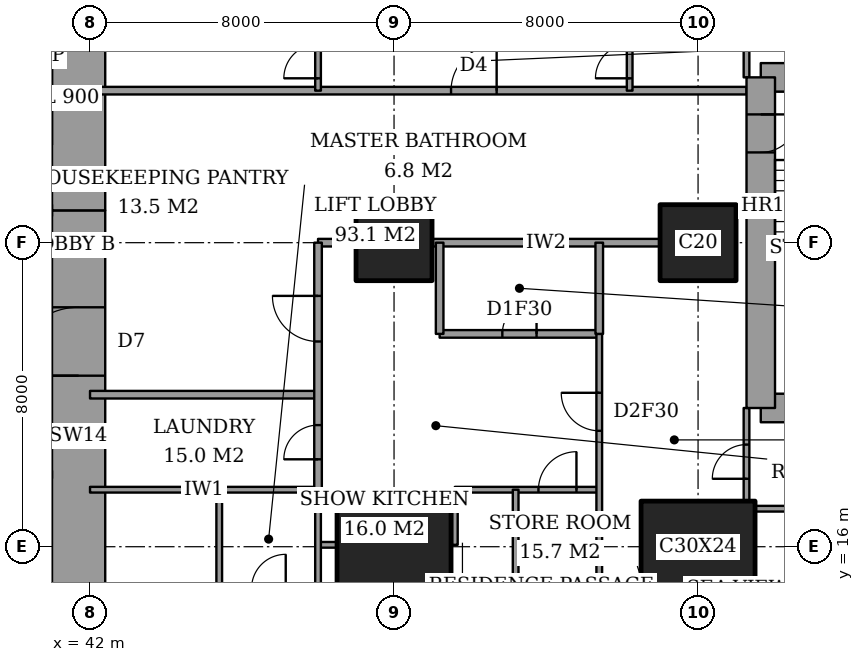
"""IFC4 building model, lengths in metres.
Left out: names, types, materials, properties, quantities, classifications, styles, units other than length and angle.
Written with IfcOpenShell. Run it as: python <this file> out.ifc"""

import sys

from ifc_helpers import new_model, si_unit, direction, frame, frame_2d, origin, origin_2d, place, context, subcontext, project, spatial, rectangle, extrude, element, fill, save


model = new_model("IFC4")
c1 = context("Model", 3, precision=1e-05, world=origin(), true_north=direction((0.0, 1.0)))
c2 = subcontext(c1, "Body", "Model", "MODEL_VIEW")
j1 = project(units=[si_unit("LENGTHUNIT", "METRE"), si_unit("PLANEANGLEUNIT", "RADIAN")], contexts=[c1])
p1 = place(None, origin())
s1 = spatial("IfcSite", under=j1, at=p1, CompositionType="ELEMENT")
p2 = place(p1, origin())
s2 = spatial("IfcBuilding", under=s1, at=p2, CompositionType="ELEMENT")
p3 = place(p2, frame((0.0, 0.0, 128.6)))
s3 = spatial("IfcBuildingStorey", under=s2, at=p3, CompositionType="ELEMENT", Elevation=128.6)
p4 = place(p3, frame((50.0, 16.0, 0.0), z_axis=(0.0, 0.0, 1.0), x_axis=(1.0, 0.0, 0.0)))
e1 = element("IfcColumn", 1, at=p4, inside=s3, PredefinedType="COLUMN", context=c2, shape_type="SweptSolid", body=[
    extrude(rectangle(XDim=3.0, YDim=2.4, at=origin_2d()), origin(), (0.0, 0.0, 1.0), 3.6),
])
p5 = place(p3, frame((50.0, 24.0, 0.0), z_axis=(0.0, 0.0, 1.0), x_axis=(1.0, 0.0, 0.0)))
e2 = element("IfcColumn", 2, at=p5, inside=s3, PredefinedType="COLUMN", context=c2, shape_type="SweptSolid", body=[
    extrude(rectangle(XDim=2.0, YDim=2.0, at=origin_2d()), origin(), (0.0, 0.0, 1.0), 3.6),
])
p6 = place(p3, frame((58.0, 16.0, 0.0), z_axis=(0.0, 0.0, 1.0), x_axis=(1.0, 0.0, 0.0)))
e3 = element("IfcColumn", 3, at=p6, inside=s3, PredefinedType="COLUMN", context=c2, shape_type="SweptSolid", body=[
    extrude(rectangle(XDim=3.0, YDim=2.4, at=origin_2d()), origin(), (0.0, 0.0, 1.0), 3.6),
])
p7 = place(p3, frame((58.0, 24.0, 0.0), z_axis=(0.0, 0.0, 1.0), x_axis=(1.0, 0.0, 0.0)))
e4 = element("IfcColumn", 4, at=p7, inside=s3, PredefinedType="COLUMN", context=c2, shape_type="SweptSolid", body=[
    extrude(rectangle(XDim=2.0, YDim=2.0, at=origin_2d()), origin(), (0.0, 0.0, 1.0), 3.6),
])
p8 = place(p3, frame((41.7, 13.0, 0.0), z_axis=(0.0, 0.0, 1.0), x_axis=(0.0, 1.0, 0.0)))
e5 = element("IfcWall", 5, at=p8, inside=s3, PredefinedType="SHEAR", context=c2, shape_type="SweptSolid", body=[
    extrude(rectangle(XDim=11.85, YDim=1.4, at=frame_2d((5.925, 0.0))), origin(), (0.0, 0.0, 1.0), 3.6),
])
p9 = place(p8, frame((7.5, 0.0, 0.0)))
e6 = element("IfcOpeningElement", 6, at=p9, cuts=e5, PredefinedType="OPENING", context=c2, shape_type="SweptSolid", body=[
    extrude(rectangle(XDim=1.8, YDim=2.4, at=frame_2d((0.9, 1.2))), frame((0.0, 0.71, 0.0), z_axis=(0.0, -1.0, 0.0), x_axis=(1.0, 0.0, 0.0)), (0.0, 0.0, 1.0), 1.42),
])
p10 = place(p3, frame((41.7, 24.85, 0.0), z_axis=(0.0, 0.0, 1.0), x_axis=(0.0, 1.0, 0.0)))
e7 = element("IfcWall", 7, at=p10, inside=s3, PredefinedType="SHEAR", context=c2, shape_type="SweptSolid", body=[
    extrude(rectangle(XDim=10.15, YDim=1.4, at=frame_2d((5.075, 0.0))), origin(), (0.0, 0.0, 1.0), 3.6),
])
for number, where, z_axis, x_axis in (
    (8, (59.65, 19.65, 0.0), (0.0, 0.0, 1.0), (1.0, 0.0, 0.0)),
    (9, (64.1, 28.35, 0.0), (0.0, 0.0, 1.0), (-1.0, 0.0, 0.0)),
):
    element("IfcWall", number, at=place(p3, frame(where, z_axis=z_axis, x_axis=x_axis)), inside=s3, PredefinedType="SHEAR", context=c2, shape_type="SweptSolid", body=[
        extrude(rectangle(XDim=4.45, YDim=0.75, at=frame_2d((2.225, 0.0))), origin(), (0.0, 0.0, 1.0), 3.6),
    ])
p11 = place(p3, frame((59.65, 28.35, 0.0), z_axis=(0.0, 0.0, 1.0), x_axis=(0.0, -1.0, 0.0)))
e10 = element("IfcWall", 10, at=p11, inside=s3, PredefinedType="SHEAR", context=c2, shape_type="SweptSolid", body=[
    extrude(rectangle(XDim=8.7, YDim=0.75, at=frame_2d((4.35, 0.0))), origin(), (0.0, 0.0, 1.0), 3.6),
])
p12 = place(p11, frame((0.975, 0.0, 0.0)))
e11 = element("IfcOpeningElement", 11, at=p12, cuts=e10, PredefinedType="OPENING", context=c2, shape_type="SweptSolid", body=[
    extrude(rectangle(XDim=1.0, YDim=2.1, at=frame_2d((0.5, 1.05))), frame((0.0, 0.385, 0.0), z_axis=(0.0, -1.0, 0.0), x_axis=(1.0, 0.0, 0.0)), (0.0, 0.0, 1.0), 0.77),
])
p13 = place(p3, frame((55.4, 15.0, 0.0), z_axis=(0.0, 0.0, 1.0), x_axis=(1.0, 0.0, 0.0)))
e12 = element("IfcWall", 12, at=p13, inside=s3, PredefinedType="PARTITIONING", context=c2, shape_type="SweptSolid", body=[
    extrude(rectangle(XDim=1.1, YDim=0.15, at=frame_2d((0.55, 0.0))), origin(), (0.0, 0.0, 1.0), 3.35),
])
p14 = place(p3, frame((48.0, 16.05, 0.0), z_axis=(0.0, 0.0, 1.0), x_axis=(1.0, 0.0, 0.0)))
e13 = element("IfcWall", 13, at=p14, inside=s3, PredefinedType="PARTITIONING", context=c2, shape_type="SweptSolid", body=[
    extrude(rectangle(XDim=0.5, YDim=0.15, at=frame_2d((0.25, 0.0))), origin(), (0.0, 0.0, 1.0), 3.35),
])
p15 = place(p3, frame((59.5, 17.0, 0.0), z_axis=(0.0, 0.0, 1.0), x_axis=(1.0, 0.0, 0.0)))
e14 = element("IfcWall", 14, at=p15, inside=s3, PredefinedType="PARTITIONING", context=c2, shape_type="SweptSolid", body=[
    extrude(rectangle(XDim=5.15, YDim=0.15, at=frame_2d((2.575, 0.0))), origin(), (0.0, 0.0, 1.0), 3.35),
])
p16 = place(p3, frame((42.0, 17.5, 0.0), z_axis=(0.0, 0.0, 1.0), x_axis=(1.0, 0.0, 0.0)))
e15 = element("IfcWall", 15, at=p16, inside=s3, PredefinedType="PARTITIONING", context=c2, shape_type="SweptSolid", body=[
    extrude(rectangle(XDim=6.0, YDim=0.15, at=frame_2d((3.0, 0.0))), origin(), (0.0, 0.0, 1.0), 3.35),
])
p17 = place(p3, frame((51.6, 17.5, 0.0), z_axis=(0.0, 0.0, 1.0), x_axis=(1.0, 0.0, 0.0)))
e16 = element("IfcWall", 16, at=p17, inside=s3, PredefinedType="PARTITIONING", context=c2, shape_type="SweptSolid", body=[
    extrude(rectangle(XDim=3.8, YDim=0.15, at=frame_2d((1.9, 0.0))), origin(), (0.0, 0.0, 1.0), 3.35),
])
p18 = place(p17, frame((2.2, 0.0, 0.0)))
e17 = element("IfcOpeningElement", 17, at=p18, cuts=e16, PredefinedType="OPENING", context=c2, shape_type="SweptSolid", body=[
    extrude(rectangle(XDim=1.0, YDim=2.1, at=frame_2d((0.5, 1.05))), frame((0.0, 0.085, 0.0), z_axis=(0.0, -1.0, 0.0), x_axis=(1.0, 0.0, 0.0)), (0.0, 0.0, 1.0), 0.17),
])
p19 = place(p3, frame((42.0, 20.0, 0.0), z_axis=(0.0, 0.0, 1.0), x_axis=(1.0, 0.0, 0.0)))
e18 = element("IfcWall", 18, at=p19, inside=s3, PredefinedType="PARTITIONING", context=c2, shape_type="SweptSolid", body=[
    extrude(rectangle(XDim=6.0, YDim=0.2, at=frame_2d((3.0, 0.0))), origin(), (0.0, 0.0, 1.0), 3.35),
])
p20 = place(p3, frame((51.2, 21.6, 0.0), z_axis=(0.0, 0.0, 1.0), x_axis=(1.0, 0.0, 0.0)))
e19 = element("IfcWall", 19, at=p20, inside=s3, PredefinedType="PARTITIONING", context=c2, shape_type="SweptSolid", body=[
    extrude(rectangle(XDim=4.2, YDim=0.2, at=frame_2d((2.1, 0.0))), origin(), (0.0, 0.0, 1.0), 3.35),
])
p21 = place(p20, frame((1.65, 0.0, 0.0)))
e20 = element("IfcOpeningElement", 20, at=p21, cuts=e19, PredefinedType="OPENING", context=c2, shape_type="SweptSolid", body=[
    extrude(rectangle(XDim=0.9, YDim=2.1, at=frame_2d((0.45, 1.05))), frame((0.0, 0.11, 0.0), z_axis=(0.0, -1.0, 0.0), x_axis=(1.0, 0.0, 0.0)), (0.0, 0.0, 1.0), 0.22),
])
p22 = place(p3, frame((48.0, 24.0, 0.0), z_axis=(0.0, 0.0, 1.0), x_axis=(1.0, 0.0, 0.0)))
e21 = element("IfcWall", 21, at=p22, inside=s3, PredefinedType="PARTITIONING", context=c2, shape_type="SweptSolid", body=[
    extrude(rectangle(XDim=1.0, YDim=0.2, at=frame_2d((0.5, 0.0))), origin(), (0.0, 0.0, 1.0), 3.35),
])
p23 = place(p3, frame((51.0, 24.0, 0.0), z_axis=(0.0, 0.0, 1.0), x_axis=(1.0, 0.0, 0.0)))
e22 = element("IfcWall", 22, at=p23, inside=s3, PredefinedType="PARTITIONING", context=c2, shape_type="SweptSolid", body=[
    extrude(rectangle(XDim=6.0, YDim=0.2, at=frame_2d((3.0, 0.0))), origin(), (0.0, 0.0, 1.0), 3.35),
])
p24 = place(p3, frame((42.0, 28.0, 0.0), z_axis=(0.0, 0.0, 1.0), x_axis=(1.0, 0.0, 0.0)))
e23 = element("IfcWall", 23, at=p24, inside=s3, PredefinedType="PARTITIONING", context=c2, shape_type="SweptSolid", body=[
    extrude(rectangle(XDim=17.275, YDim=0.2, at=frame_2d((8.637, 0.0))), origin(), (0.0, 0.0, 1.0), 3.35),
])
p25 = place(p24, frame((9.5, 0.0, 0.0)))
e24 = element("IfcOpeningElement", 24, at=p25, cuts=e23, PredefinedType="OPENING", context=c2, shape_type="SweptSolid", body=[
    extrude(rectangle(XDim=1.2, YDim=2.4, at=frame_2d((0.6, 1.2))), frame((0.0, 0.11, 0.0), z_axis=(0.0, -1.0, 0.0), x_axis=(1.0, 0.0, 0.0)), (0.0, 0.0, 1.0), 0.22),
])
p26 = place(p3, frame((45.4, 14.9, 0.0), z_axis=(0.0, 0.0, 1.0), x_axis=(0.0, 1.0, 0.0)))
e25 = element("IfcWall", 25, at=p26, inside=s3, PredefinedType="PARTITIONING", context=c2, shape_type="SweptSolid", body=[
    extrude(rectangle(XDim=2.6, YDim=0.15, at=frame_2d((1.3, 0.0))), origin(), (0.0, 0.0, 1.0), 3.35),
])
p27 = place(p3, frame((48.0, 17.5, 0.0), z_axis=(0.0, 0.0, 1.0), x_axis=(0.0, 1.0, 0.0)))
e26 = element("IfcWall", 26, at=p27, inside=s3, PredefinedType="PARTITIONING", context=c2, shape_type="SweptSolid", body=[
    extrude(rectangle(XDim=6.5, YDim=0.2, at=frame_2d((3.25, 0.0))), origin(), (0.0, 0.0, 1.0), 3.35),
])
p28 = place(p27, frame((3.9, 0.0, 0.0)))
e27 = element("IfcOpeningElement", 27, at=p28, cuts=e26, PredefinedType="OPENING", context=c2, shape_type="SweptSolid", body=[
    extrude(rectangle(XDim=1.2, YDim=2.4, at=frame_2d((0.6, 1.2))), frame((0.0, 0.11, 0.0), z_axis=(0.0, -1.0, 0.0), x_axis=(1.0, 0.0, 0.0)), (0.0, 0.0, 1.0), 0.22),
])
p29 = place(p27, frame((0.8, 0.0, 0.0)))
e28 = element("IfcOpeningElement", 28, at=p29, cuts=e26, PredefinedType="OPENING", context=c2, shape_type="SweptSolid", body=[
    extrude(rectangle(XDim=0.9, YDim=2.1, at=frame_2d((0.45, 1.05))), frame((0.0, 0.11, 0.0), z_axis=(0.0, -1.0, 0.0), x_axis=(1.0, 0.0, 0.0)), (0.0, 0.0, 1.0), 0.22),
])
p30 = place(p3, frame((48.0, 10.8, 0.0), z_axis=(0.0, 0.0, 1.0), x_axis=(0.0, 1.0, 0.0)))
e29 = element("IfcWall", 29, at=p30, inside=s3, PredefinedType="PARTITIONING", context=c2, shape_type="SweptSolid", body=[
    extrude(rectangle(XDim=6.7, YDim=0.15, at=frame_2d((3.35, 0.0))), origin(), (0.0, 0.0, 1.0), 3.35),
])
p31 = place(p3, frame((48.0, 28.0, 0.0), z_axis=(0.0, 0.0, 1.0), x_axis=(0.0, 1.0, 0.0)))
e30 = element("IfcWall", 30, at=p31, inside=s3, PredefinedType="PARTITIONING", context=c2, shape_type="SweptSolid", body=[
    extrude(rectangle(XDim=9.4, YDim=0.15, at=frame_2d((4.7, 0.0))), origin(), (0.0, 0.0, 1.0), 3.35),
])
p32 = place(p31, frame((0.325, 0.0, 0.0)))
e31 = element("IfcOpeningElement", 31, at=p32, cuts=e30, PredefinedType="OPENING", context=c2, shape_type="SweptSolid", body=[
    extrude(rectangle(XDim=0.9, YDim=2.1, at=frame_2d((0.45, 1.05))), frame((0.0, 0.085, 0.0), z_axis=(0.0, -1.0, 0.0), x_axis=(1.0, 0.0, 0.0)), (0.0, 0.0, 1.0), 0.17),
])
p33 = place(p3, frame((51.2, 21.6, 0.0), z_axis=(0.0, 0.0, 1.0), x_axis=(0.0, 1.0, 0.0)))
e32 = element("IfcWall", 32, at=p33, inside=s3, PredefinedType="PARTITIONING", context=c2, shape_type="SweptSolid", body=[
    extrude(rectangle(XDim=2.4, YDim=0.2, at=frame_2d((1.2, 0.0))), origin(), (0.0, 0.0, 1.0), 3.35),
])
p34 = place(p3, frame((51.6, 16.05, 0.0), z_axis=(0.0, 0.0, 1.0), x_axis=(0.0, 1.0, 0.0)))
e33 = element("IfcWall", 33, at=p34, inside=s3, PredefinedType="PARTITIONING", context=c2, shape_type="SweptSolid", body=[
    extrude(rectangle(XDim=1.45, YDim=0.15, at=frame_2d((0.725, 0.0))), origin(), (0.0, 0.0, 1.0), 3.35),
])
p35 = place(p3, frame((53.2, 10.8, 0.0), z_axis=(0.0, 0.0, 1.0), x_axis=(0.0, 1.0, 0.0)))
e34 = element("IfcWall", 34, at=p35, inside=s3, PredefinedType="PARTITIONING", context=c2, shape_type="SweptSolid", body=[
    extrude(rectangle(XDim=6.7, YDim=0.15, at=frame_2d((3.35, 0.0))), origin(), (0.0, 0.0, 1.0), 3.35),
])
p36 = place(p3, frame((55.4, 21.6, 0.0), z_axis=(0.0, 0.0, 1.0), x_axis=(0.0, 1.0, 0.0)))
e35 = element("IfcWall", 35, at=p36, inside=s3, PredefinedType="PARTITIONING", context=c2, shape_type="SweptSolid", body=[
    extrude(rectangle(XDim=2.4, YDim=0.2, at=frame_2d((1.2, 0.0))), origin(), (0.0, 0.0, 1.0), 3.35),
])
p37 = place(p3, frame((55.4, 10.8, 0.0), z_axis=(0.0, 0.0, 1.0), x_axis=(0.0, 1.0, 0.0)))
e36 = element("IfcWall", 36, at=p37, inside=s3, PredefinedType="PARTITIONING", context=c2, shape_type="SweptSolid", body=[
    extrude(rectangle(XDim=10.8, YDim=0.15, at=frame_2d((5.4, 0.0))), origin(), (0.0, 0.0, 1.0), 3.35),
])
p38 = place(p37, frame((8.25, 0.0, 0.0)))
e37 = element("IfcOpeningElement", 37, at=p38, cuts=e36, PredefinedType="OPENING", context=c2, shape_type="SweptSolid", body=[
    extrude(rectangle(XDim=1.0, YDim=2.1, at=frame_2d((0.5, 1.05))), frame((0.0, 0.085, 0.0), z_axis=(0.0, -1.0, 0.0), x_axis=(1.0, 0.0, 0.0)), (0.0, 0.0, 1.0), 0.17),
])
p39 = place(p3, frame((56.2, 28.0, 0.0), z_axis=(0.0, 0.0, 1.0), x_axis=(0.0, 1.0, 0.0)))
e38 = element("IfcWall", 38, at=p39, inside=s3, PredefinedType="PARTITIONING", context=c2, shape_type="SweptSolid", body=[
    extrude(rectangle(XDim=9.4, YDim=0.15, at=frame_2d((4.7, 0.0))), origin(), (0.0, 0.0, 1.0), 3.35),
])
p40 = place(p39, frame((0.325, 0.0, 0.0)))
e39 = element("IfcOpeningElement", 39, at=p40, cuts=e38, PredefinedType="OPENING", context=c2, shape_type="SweptSolid", body=[
    extrude(rectangle(XDim=0.9, YDim=2.1, at=frame_2d((0.45, 1.05))), frame((0.0, 0.085, 0.0), z_axis=(0.0, -1.0, 0.0), x_axis=(1.0, 0.0, 0.0)), (0.0, 0.0, 1.0), 0.17),
])
p41 = place(p3, frame((59.275, 17.2, 0.0), z_axis=(0.0, 0.0, 1.0), x_axis=(0.0, 1.0, 0.0)))
e40 = element("IfcWall", 40, at=p41, inside=s3, PredefinedType="PARTITIONING", context=c2, shape_type="SweptSolid", body=[
    extrude(rectangle(XDim=2.45, YDim=0.15, at=frame_2d((1.225, 0.0))), origin(), (0.0, 0.0, 1.0), 3.35),
])
p42 = place(p41, frame((0.587, 0.0, 0.0)))
e41 = element("IfcOpeningElement", 41, at=p42, cuts=e40, PredefinedType="OPENING", context=c2, shape_type="SweptSolid", body=[
    extrude(rectangle(XDim=0.9, YDim=2.1, at=frame_2d((0.45, 1.05))), frame((0.0, 0.085, 0.0), z_axis=(0.0, -1.0, 0.0), x_axis=(1.0, 0.0, 0.0)), (0.0, 0.0, 1.0), 0.17),
])
p43 = place(p3, frame((59.275, 28.35, 0.0), z_axis=(0.0, 0.0, 1.0), x_axis=(0.0, 1.0, 0.0)))
e42 = element("IfcWall", 42, at=p43, inside=s3, PredefinedType="PARTITIONING", context=c2, shape_type="SweptSolid", body=[
    extrude(rectangle(XDim=2.45, YDim=0.15, at=frame_2d((1.225, 0.0))), origin(), (0.0, 0.0, 1.0), 3.35),
])
p44 = place(p43, frame((0.913, 0.0, 0.0)))
e43 = element("IfcOpeningElement", 43, at=p44, cuts=e42, PredefinedType="OPENING", context=c2, shape_type="SweptSolid", body=[
    extrude(rectangle(XDim=1.0, YDim=2.1, at=frame_2d((0.5, 1.05))), frame((0.0, 0.085, 0.0), z_axis=(0.0, -1.0, 0.0), x_axis=(1.0, 0.0, 0.0)), (0.0, 0.0, 1.0), 0.17),
])
p45 = place(p3, frame((28.3, 17.9, 0.0), z_axis=(0.0, 0.0, 1.0), x_axis=(1.0, 0.0, 0.0)))
e44 = element("IfcWall", 44, at=p45, inside=s3, PredefinedType="PARTITIONING", context=c2, shape_type="SweptSolid", body=[
    extrude(rectangle(XDim=12.7, YDim=0.2, at=frame_2d((6.35, 0.0))), origin(), (0.0, 0.0, 1.0), 3.6),
])
p46 = place(p45, frame((0.95, 0.0, 0.0)))
e45 = element("IfcOpeningElement", 45, at=p46, cuts=e44, PredefinedType="OPENING", context=c2, shape_type="SweptSolid", body=[
    extrude(rectangle(XDim=1.1, YDim=2.1, at=frame_2d((0.55, 1.05))), frame((0.0, 0.11, 0.0), z_axis=(0.0, -1.0, 0.0), x_axis=(1.0, 0.0, 0.0)), (0.0, 0.0, 1.0), 0.22),
])
p47 = place(p45, frame((4.15, 0.0, 0.0)))
e46 = element("IfcOpeningElement", 46, at=p47, cuts=e44, PredefinedType="OPENING", context=c2, shape_type="SweptSolid", body=[
    extrude(rectangle(XDim=1.1, YDim=2.1, at=frame_2d((0.55, 1.05))), frame((0.0, 0.11, 0.0), z_axis=(0.0, -1.0, 0.0), x_axis=(1.0, 0.0, 0.0)), (0.0, 0.0, 1.0), 0.22),
])
p48 = place(p45, frame((7.35, 0.0, 0.0)))
e47 = element("IfcOpeningElement", 47, at=p48, cuts=e44, PredefinedType="OPENING", context=c2, shape_type="SweptSolid", body=[
    extrude(rectangle(XDim=1.1, YDim=2.1, at=frame_2d((0.55, 1.05))), frame((0.0, 0.11, 0.0), z_axis=(0.0, -1.0, 0.0), x_axis=(1.0, 0.0, 0.0)), (0.0, 0.0, 1.0), 0.22),
])
p49 = place(p45, frame((10.6, 0.0, 0.0)))
e48 = element("IfcOpeningElement", 48, at=p49, cuts=e44, PredefinedType="OPENING", context=c2, shape_type="SweptSolid", body=[
    extrude(rectangle(XDim=1.2, YDim=2.1, at=frame_2d((0.6, 1.05))), frame((0.0, 0.11, 0.0), z_axis=(0.0, -1.0, 0.0), x_axis=(1.0, 0.0, 0.0)), (0.0, 0.0, 1.0), 0.22),
])
p50 = place(p42, origin())
e49 = element("IfcDoor", 49, at=p50, inside=s3, OperationType="SINGLE_SWING_RIGHT", PredefinedType="DOOR", context=c2, shape_type="SweptSolid", body=[
    extrude(rectangle(XDim=0.9, YDim=2.1, at=frame_2d((0.45, 1.05))), frame((0.0, 0.025, 0.0), z_axis=(0.0, -1.0, 0.0), x_axis=(1.0, 0.0, 0.0)), (0.0, 0.0, 1.0), 0.05),
])
fill(e41, e49)
p51 = place(p38, origin())
e50 = element("IfcDoor", 50, at=p51, inside=s3, OperationType="SINGLE_SWING_LEFT", PredefinedType="DOOR", context=c2, shape_type="SweptSolid", body=[
    extrude(rectangle(XDim=1.0, YDim=2.1, at=frame_2d((0.5, 1.05))), frame((0.0, 0.025, 0.0), z_axis=(0.0, -1.0, 0.0), x_axis=(1.0, 0.0, 0.0)), (0.0, 0.0, 1.0), 0.05),
])
fill(e37, e50)
p52 = place(p21, origin())
e51 = element("IfcDoor", 51, at=p52, inside=s3, OperationType="SINGLE_SWING_LEFT", PredefinedType="DOOR", context=c2, shape_type="SweptSolid", body=[
    extrude(rectangle(XDim=0.9, YDim=2.1, at=frame_2d((0.45, 1.05))), frame((0.0, 0.025, 0.0), z_axis=(0.0, -1.0, 0.0), x_axis=(1.0, 0.0, 0.0)), (0.0, 0.0, 1.0), 0.05),
])
fill(e20, e51)
p53 = place(p28, origin())
e52 = element("IfcDoor", 52, at=p53, inside=s3, OperationType="SINGLE_SWING_LEFT", PredefinedType="DOOR", context=c2, shape_type="SweptSolid", body=[
    extrude(rectangle(XDim=1.2, YDim=2.4, at=frame_2d((0.6, 1.2))), frame((0.0, 0.025, 0.0), z_axis=(0.0, -1.0, 0.0), x_axis=(1.0, 0.0, 0.0)), (0.0, 0.0, 1.0), 0.05),
])
fill(e27, e52)
p54 = place(p18, origin())
e53 = element("IfcDoor", 53, at=p54, inside=s3, OperationType="SINGLE_SWING_LEFT", PredefinedType="DOOR", context=c2, shape_type="SweptSolid", body=[
    extrude(rectangle(XDim=1.0, YDim=2.1, at=frame_2d((0.5, 1.05))), frame((0.0, 0.025, 0.0), z_axis=(0.0, -1.0, 0.0), x_axis=(1.0, 0.0, 0.0)), (0.0, 0.0, 1.0), 0.05),
])
fill(e17, e53)
p55 = place(p29, origin())
e54 = element("IfcDoor", 54, at=p55, inside=s3, OperationType="SINGLE_SWING_RIGHT", PredefinedType="DOOR", context=c2, shape_type="SweptSolid", body=[
    extrude(rectangle(XDim=0.9, YDim=2.1, at=frame_2d((0.45, 1.05))), frame((0.0, 0.025, 0.0), z_axis=(0.0, -1.0, 0.0), x_axis=(1.0, 0.0, 0.0)), (0.0, 0.0, 1.0), 0.05),
])
fill(e28, e54)
p56 = place(p40, origin())
e55 = element("IfcDoor", 55, at=p56, inside=s3, OperationType="SINGLE_SWING_RIGHT", PredefinedType="DOOR", context=c2, shape_type="SweptSolid", body=[
    extrude(rectangle(XDim=0.9, YDim=2.1, at=frame_2d((0.45, 1.05))), frame((0.0, 0.025, 0.0), z_axis=(0.0, -1.0, 0.0), x_axis=(1.0, 0.0, 0.0)), (0.0, 0.0, 1.0), 0.05),
])
fill(e39, e55)
p57 = place(p25, origin())
e56 = element("IfcDoor", 56, at=p57, inside=s3, OperationType="SINGLE_SWING_LEFT", PredefinedType="DOOR", context=c2, shape_type="SweptSolid", body=[
    extrude(rectangle(XDim=1.2, YDim=2.4, at=frame_2d((0.6, 1.2))), frame((0.0, 0.025, 0.0), z_axis=(0.0, -1.0, 0.0), x_axis=(1.0, 0.0, 0.0)), (0.0, 0.0, 1.0), 0.05),
])
fill(e24, e56)
p58 = place(p32, origin())
e57 = element("IfcDoor", 57, at=p58, inside=s3, OperationType="SINGLE_SWING_RIGHT", PredefinedType="DOOR", context=c2, shape_type="SweptSolid", body=[
    extrude(rectangle(XDim=0.9, YDim=2.1, at=frame_2d((0.45, 1.05))), frame((0.0, 0.025, 0.0), z_axis=(0.0, -1.0, 0.0), x_axis=(1.0, 0.0, 0.0)), (0.0, 0.0, 1.0), 0.05),
])
fill(e31, e57)
p59 = place(p9, origin())
e58 = element("IfcDoor", 58, at=p59, inside=s3, OperationType="DOUBLE_DOOR_DOUBLE_SWING", PredefinedType="DOOR", context=c2, shape_type="SweptSolid", body=[
    extrude(rectangle(XDim=1.8, YDim=2.4, at=frame_2d((0.9, 1.2))), frame((0.0, 0.025, 0.0), z_axis=(0.0, -1.0, 0.0), x_axis=(1.0, 0.0, 0.0)), (0.0, 0.0, 1.0), 0.05),
])
fill(e6, e58)
p60 = place(p12, origin())
e59 = element("IfcDoor", 59, at=p60, inside=s3, OperationType="SINGLE_SWING_RIGHT", PredefinedType="DOOR", context=c2, shape_type="SweptSolid", body=[
    extrude(rectangle(XDim=1.0, YDim=2.1, at=frame_2d((0.5, 1.05))), frame((0.0, 0.025, 0.0), z_axis=(0.0, -1.0, 0.0), x_axis=(1.0, 0.0, 0.0)), (0.0, 0.0, 1.0), 0.05),
])
fill(e11, e59)
save(model, sys.argv[1])
